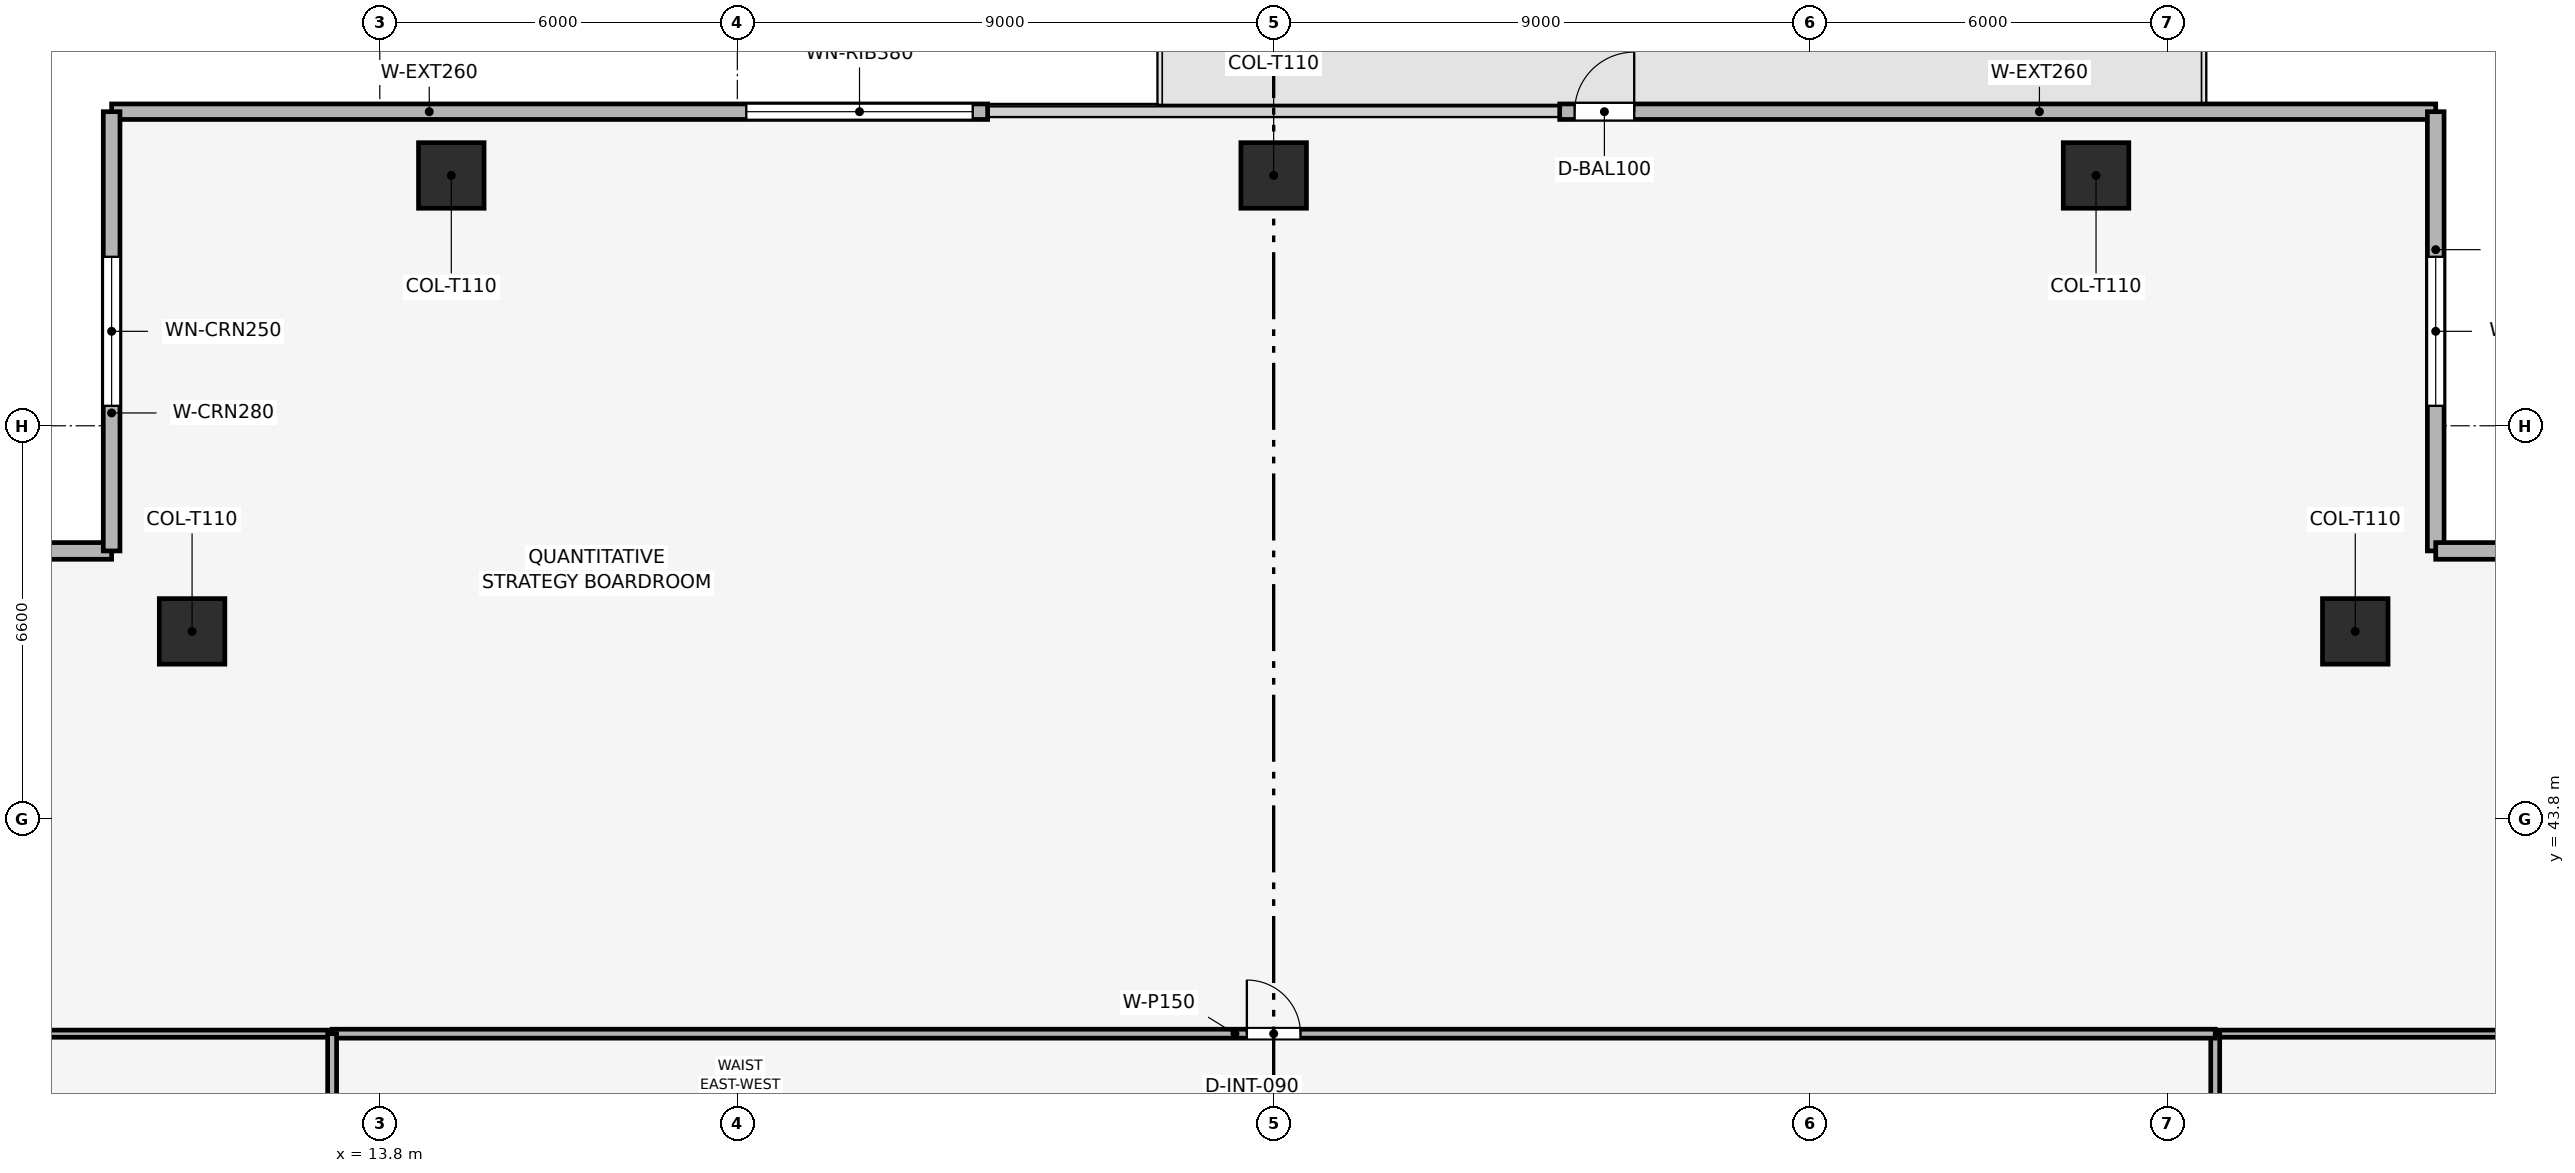
"""IFC4 building model, lengths in metres.
Left out: names, types, materials, properties, quantities, classifications, styles, units other than length and angle.
Written with IfcOpenShell. Run it as: python <this file> out.ifc"""

import sys

from ifc_helpers import new_model, si_unit, direction, frame, frame_2d, origin, origin_2d, place, context, subcontext, project, spatial, rectangle, extrude, element, fill, save


model = new_model("IFC4")
c1 = context("Model", 3, precision=1e-05, world=origin(), true_north=direction((0.0, 1.0)))
c2 = subcontext(c1, "Body", "Model", "MODEL_VIEW")
j1 = project(units=[si_unit("LENGTHUNIT", "METRE"), si_unit("PLANEANGLEUNIT", "RADIAN")], contexts=[c1])
p1 = place(None, origin())
s1 = spatial("IfcSite", under=j1, at=p1, CompositionType="ELEMENT")
p2 = place(p1, origin())
s2 = spatial("IfcBuilding", under=s1, at=p2, CompositionType="ELEMENT")
p3 = place(p2, frame((0.0, 0.0, 229.95)))
s3 = spatial("IfcBuildingStorey", under=s2, at=p3, CompositionType="ELEMENT", Elevation=229.95)
for number, where, z_axis, x_axis in (
    (1, (42.6, 54.6, 0.003), (0.0, 0.0, 1.0), (1.0, 0.0, 0.0)),
    (2, (28.8, 54.6, 0.003), (0.0, 0.0, 1.0), (1.0, 0.0, 0.0)),
    (3, (15.0, 54.6, 0.003), (0.0, 0.0, 1.0), (1.0, 0.0, 0.0)),
    (4, (46.95, 46.95, 0.003), (0.0, 0.0, 1.0), (1.0, 0.0, 0.0)),
    (5, (10.65, 46.95, 0.003), (0.0, 0.0, 1.0), (1.0, 0.0, 0.0)),
):
    element("IfcColumn", number, at=place(p3, frame(where, z_axis=z_axis, x_axis=x_axis)), inside=s3, PredefinedType="COLUMN", context=c2, shape_type="SweptSolid", body=[
        extrude(rectangle(XDim=1.1, YDim=1.1, at=origin_2d()), origin(), (0.0, 0.0, 1.0), 3.494),
    ])
p4 = place(p3, frame((9.3, 55.67, 0.0), z_axis=(0.0, 0.0, 1.0), x_axis=(1.0, 0.0, 0.0)))
e6 = element("IfcWall", 6, at=p4, inside=s3, PredefinedType="SOLIDWALL", context=c2, shape_type="SweptSolid", body=[
    extrude(rectangle(XDim=14.7, YDim=0.26, at=frame_2d((7.35, 0.0))), origin(), (0.0, 0.0, 1.0), 3.5),
])
p5 = place(p4, frame((10.65, 0.0, 0.9)))
e7 = element("IfcOpeningElement", 7, at=p5, cuts=e6, PredefinedType="OPENING", context=c2, shape_type="SweptSolid", body=[
    extrude(rectangle(XDim=3.8, YDim=1.9, at=frame_2d((1.9, 0.95))), frame((0.0, 0.14, 0.0), z_axis=(0.0, -1.0, 0.0), x_axis=(1.0, 0.0, 0.0)), (0.0, 0.0, 1.0), 0.28),
])
p6 = place(p3, frame((33.6, 55.67, 0.0), z_axis=(0.0, 0.0, 1.0), x_axis=(1.0, 0.0, 0.0)))
e8 = element("IfcWall", 8, at=p6, inside=s3, PredefinedType="SOLIDWALL", context=c2, shape_type="SweptSolid", body=[
    extrude(rectangle(XDim=14.7, YDim=0.26, at=frame_2d((7.35, 0.0))), origin(), (0.0, 0.0, 1.0), 3.5),
])
p7 = place(p6, frame((0.25, 0.0, 0.0)))
e9 = element("IfcOpeningElement", 9, at=p7, cuts=e8, PredefinedType="OPENING", context=c2, shape_type="SweptSolid", body=[
    extrude(rectangle(XDim=1.0, YDim=2.2, at=frame_2d((0.5, 1.1))), frame((0.0, 0.14, 0.0), z_axis=(0.0, -1.0, 0.0), x_axis=(1.0, 0.0, 0.0)), (0.0, 0.0, 1.0), 0.28),
])
p8 = place(p3, frame((1.93, 48.3, 0.0), z_axis=(0.0, 0.0, 1.0), x_axis=(1.0, 0.0, 0.0)))
e10 = element("IfcWall", 10, at=p8, inside=s3, PredefinedType="SOLIDWALL", context=c2, shape_type="SweptSolid", body=[
    extrude(rectangle(XDim=7.37, YDim=0.28, at=frame_2d((3.685, 0.0))), origin(), (0.0, 0.0, 1.0), 3.5),
])
p9 = place(p8, frame((2.435, 0.0, 0.9)))
e11 = element("IfcOpeningElement", 11, at=p9, cuts=e10, PredefinedType="OPENING", context=c2, shape_type="SweptSolid", body=[
    extrude(rectangle(XDim=2.5, YDim=1.9, at=frame_2d((1.25, 0.95))), frame((0.0, 0.15, 0.0), z_axis=(0.0, -1.0, 0.0), x_axis=(1.0, 0.0, 0.0)), (0.0, 0.0, 1.0), 0.3),
])
p10 = place(p3, frame((9.3, 48.3, 0.0), z_axis=(0.0, 0.0, 1.0), x_axis=(0.0, 1.0, 0.0)))
e12 = element("IfcWall", 12, at=p10, inside=s3, PredefinedType="SOLIDWALL", context=c2, shape_type="SweptSolid", body=[
    extrude(rectangle(XDim=7.37, YDim=0.28, at=frame_2d((3.685, 0.0))), origin(), (0.0, 0.0, 1.0), 3.5),
])
p11 = place(p10, frame((2.435, 0.0, 0.9)))
e13 = element("IfcOpeningElement", 13, at=p11, cuts=e12, PredefinedType="OPENING", context=c2, shape_type="SweptSolid", body=[
    extrude(rectangle(XDim=2.5, YDim=1.9, at=frame_2d((1.25, 0.95))), frame((0.0, 0.15, 0.0), z_axis=(0.0, -1.0, 0.0), x_axis=(1.0, 0.0, 0.0)), (0.0, 0.0, 1.0), 0.3),
])
p12 = place(p3, frame((48.3, 55.67, 0.0), z_axis=(0.0, 0.0, 1.0), x_axis=(0.0, -1.0, 0.0)))
e14 = element("IfcWall", 14, at=p12, inside=s3, PredefinedType="SOLIDWALL", context=c2, shape_type="SweptSolid", body=[
    extrude(rectangle(XDim=7.37, YDim=0.28, at=frame_2d((3.685, 0.0))), origin(), (0.0, 0.0, 1.0), 3.5),
])
p13 = place(p12, frame((2.435, 0.0, 0.9)))
e15 = element("IfcOpeningElement", 15, at=p13, cuts=e14, PredefinedType="OPENING", context=c2, shape_type="SweptSolid", body=[
    extrude(rectangle(XDim=2.5, YDim=1.9, at=frame_2d((1.25, 0.95))), frame((0.0, 0.15, 0.0), z_axis=(0.0, -1.0, 0.0), x_axis=(1.0, 0.0, 0.0)), (0.0, 0.0, 1.0), 0.3),
])
p14 = place(p3, frame((48.3, 48.3, 0.0), z_axis=(0.0, 0.0, 1.0), x_axis=(1.0, 0.0, 0.0)))
e16 = element("IfcWall", 16, at=p14, inside=s3, PredefinedType="SOLIDWALL", context=c2, shape_type="SweptSolid", body=[
    extrude(rectangle(XDim=7.37, YDim=0.28, at=frame_2d((3.685, 0.0))), origin(), (0.0, 0.0, 1.0), 3.5),
])
p15 = place(p14, frame((2.435, 0.0, 0.9)))
e17 = element("IfcOpeningElement", 17, at=p15, cuts=e16, PredefinedType="OPENING", context=c2, shape_type="SweptSolid", body=[
    extrude(rectangle(XDim=2.5, YDim=1.9, at=frame_2d((1.25, 0.95))), frame((0.0, 0.15, 0.0), z_axis=(0.0, -1.0, 0.0), x_axis=(1.0, 0.0, 0.0)), (0.0, 0.0, 1.0), 0.3),
])
p16 = place(p3, frame((1.93, 40.2, 0.0), z_axis=(0.0, 0.0, 1.0), x_axis=(1.0, 0.0, 0.0)))
e18 = element("IfcWall", 18, at=p16, inside=s3, PredefinedType="PARTITIONING", context=c2, shape_type="SweptSolid", body=[
    extrude(rectangle(XDim=11.07, YDim=0.12, at=frame_2d((5.535, 0.0))), origin(), (0.0, 0.0, 1.0), 2.885),
])
p17 = place(p3, frame((44.6, 40.2, 0.0), z_axis=(0.0, 0.0, 1.0), x_axis=(1.0, 0.0, 0.0)))
e19 = element("IfcWall", 19, at=p17, inside=s3, PredefinedType="PARTITIONING", context=c2, shape_type="SweptSolid", body=[
    extrude(rectangle(XDim=11.07, YDim=0.12, at=frame_2d((5.535, 0.0))), origin(), (0.0, 0.0, 1.0), 2.885),
])
p18 = place(p3, frame((44.6, 37.8, 0.0), z_axis=(0.0, 0.0, 1.0), x_axis=(0.0, 1.0, 0.0)))
e20 = element("IfcWall", 20, at=p18, inside=s3, PredefinedType="PARTITIONING", context=c2, shape_type="SweptSolid", body=[
    extrude(rectangle(XDim=2.4, YDim=0.15, at=frame_2d((1.2, 0.0))), origin(), (0.0, 0.0, 1.0), 3.5),
])
p19 = place(p3, frame((13.0, 40.2, 0.0), z_axis=(0.0, 0.0, 1.0), x_axis=(1.0, 0.0, 0.0)))
e21 = element("IfcWall", 21, at=p19, inside=s3, PredefinedType="PARTITIONING", context=c2, shape_type="SweptSolid", body=[
    extrude(rectangle(XDim=31.6, YDim=0.15, at=frame_2d((15.8, 0.0))), origin(), (0.0, 0.0, 1.0), 3.035),
])
p20 = place(p19, frame((15.35, 0.0, 0.0)))
e22 = element("IfcOpeningElement", 22, at=p20, cuts=e21, PredefinedType="OPENING", context=c2, shape_type="SweptSolid", body=[
    extrude(rectangle(XDim=0.9, YDim=2.1, at=frame_2d((0.45, 1.05))), frame((0.0, 0.085, 0.0), z_axis=(0.0, -1.0, 0.0), x_axis=(1.0, 0.0, 0.0)), (0.0, 0.0, 1.0), 0.17),
])
p21 = place(p3, frame((13.0, 17.4, 0.0), z_axis=(0.0, 0.0, 1.0), x_axis=(0.0, 1.0, 0.0)))
e23 = element("IfcWall", 23, at=p21, inside=s3, PredefinedType="PARTITIONING", context=c2, shape_type="SweptSolid", body=[
    extrude(rectangle(XDim=22.8, YDim=0.15, at=frame_2d((11.4, 0.0))), origin(), (0.0, 0.0, 1.0), 3.035),
])
p22 = place(p21, frame((3.1, 0.0, 0.0)))
e24 = element("IfcOpeningElement", 24, at=p22, cuts=e23, PredefinedType="OPENING", context=c2, shape_type="SweptSolid", body=[
    extrude(rectangle(XDim=0.9, YDim=2.1, at=frame_2d((0.45, 1.05))), frame((0.0, 0.085, 0.0), z_axis=(0.0, -1.0, 0.0), x_axis=(1.0, 0.0, 0.0)), (0.0, 0.0, 1.0), 0.17),
])
p23 = place(p21, frame((6.529, 0.0, 0.0)))
e25 = element("IfcOpeningElement", 25, at=p23, cuts=e23, PredefinedType="OPENING", context=c2, shape_type="SweptSolid", body=[
    extrude(rectangle(XDim=0.9, YDim=2.1, at=frame_2d((0.45, 1.05))), frame((0.0, 0.085, 0.0), z_axis=(0.0, -1.0, 0.0), x_axis=(1.0, 0.0, 0.0)), (0.0, 0.0, 1.0), 0.17),
])
p24 = place(p21, frame((10.957, 0.0, 0.0)))
e26 = element("IfcOpeningElement", 26, at=p24, cuts=e23, PredefinedType="OPENING", context=c2, shape_type="SweptSolid", body=[
    extrude(rectangle(XDim=0.9, YDim=2.1, at=frame_2d((0.45, 1.05))), frame((0.0, 0.085, 0.0), z_axis=(0.0, -1.0, 0.0), x_axis=(1.0, 0.0, 0.0)), (0.0, 0.0, 1.0), 0.17),
])
p25 = place(p21, frame((16.527, 0.0, 0.0)))
e27 = element("IfcOpeningElement", 27, at=p25, cuts=e23, PredefinedType="OPENING", context=c2, shape_type="SweptSolid", body=[
    extrude(rectangle(XDim=0.9, YDim=2.1, at=frame_2d((0.45, 1.05))), frame((0.0, 0.085, 0.0), z_axis=(0.0, -1.0, 0.0), x_axis=(1.0, 0.0, 0.0)), (0.0, 0.0, 1.0), 0.17),
])
p26 = place(p7, origin())
e28 = element("IfcDoor", 28, at=p26, inside=s3, OperationType="SINGLE_SWING_RIGHT", PredefinedType="DOOR", context=c2, shape_type="SweptSolid", body=[
    extrude(rectangle(XDim=1.0, YDim=2.2, at=frame_2d((0.5, 1.1))), frame((0.0, 0.025, 0.0), z_axis=(0.0, -1.0, 0.0), x_axis=(1.0, 0.0, 0.0)), (0.0, 0.0, 1.0), 0.05),
])
fill(e9, e28)
p27 = place(p5, origin())
e29 = element("IfcWindow", 29, at=p27, inside=s3, PartitioningType="SINGLE_PANEL", PredefinedType="WINDOW", context=c2, shape_type="SweptSolid", body=[
    extrude(rectangle(XDim=3.8, YDim=1.9, at=frame_2d((1.9, 0.95))), frame((0.0, 0.03, 0.0), z_axis=(0.0, -1.0, 0.0), x_axis=(1.0, 0.0, 0.0)), (0.0, 0.0, 1.0), 0.06),
])
fill(e7, e29)
p28 = place(p11, origin())
e30 = element("IfcWindow", 30, at=p28, inside=s3, PartitioningType="SINGLE_PANEL", PredefinedType="WINDOW", context=c2, shape_type="SweptSolid", body=[
    extrude(rectangle(XDim=2.5, YDim=1.9, at=frame_2d((1.25, 0.95))), frame((0.0, 0.03, 0.0), z_axis=(0.0, -1.0, 0.0), x_axis=(1.0, 0.0, 0.0)), (0.0, 0.0, 1.0), 0.06),
])
fill(e13, e30)
p29 = place(p13, origin())
e31 = element("IfcWindow", 31, at=p29, inside=s3, PartitioningType="SINGLE_PANEL", PredefinedType="WINDOW", context=c2, shape_type="SweptSolid", body=[
    extrude(rectangle(XDim=2.5, YDim=1.9, at=frame_2d((1.25, 0.95))), frame((0.0, 0.03, 0.0), z_axis=(0.0, -1.0, 0.0), x_axis=(1.0, 0.0, 0.0)), (0.0, 0.0, 1.0), 0.06),
])
fill(e15, e31)
p30 = place(p20, origin())
e32 = element("IfcDoor", 32, at=p30, inside=s3, OperationType="SINGLE_SWING_LEFT", PredefinedType="DOOR", context=c2, shape_type="SweptSolid", body=[
    extrude(rectangle(XDim=0.9, YDim=2.1, at=frame_2d((0.45, 1.05))), frame((0.0, 0.025, 0.0), z_axis=(0.0, -1.0, 0.0), x_axis=(1.0, 0.0, 0.0)), (0.0, 0.0, 1.0), 0.05),
])
fill(e22, e32)
save(model, sys.argv[1])
